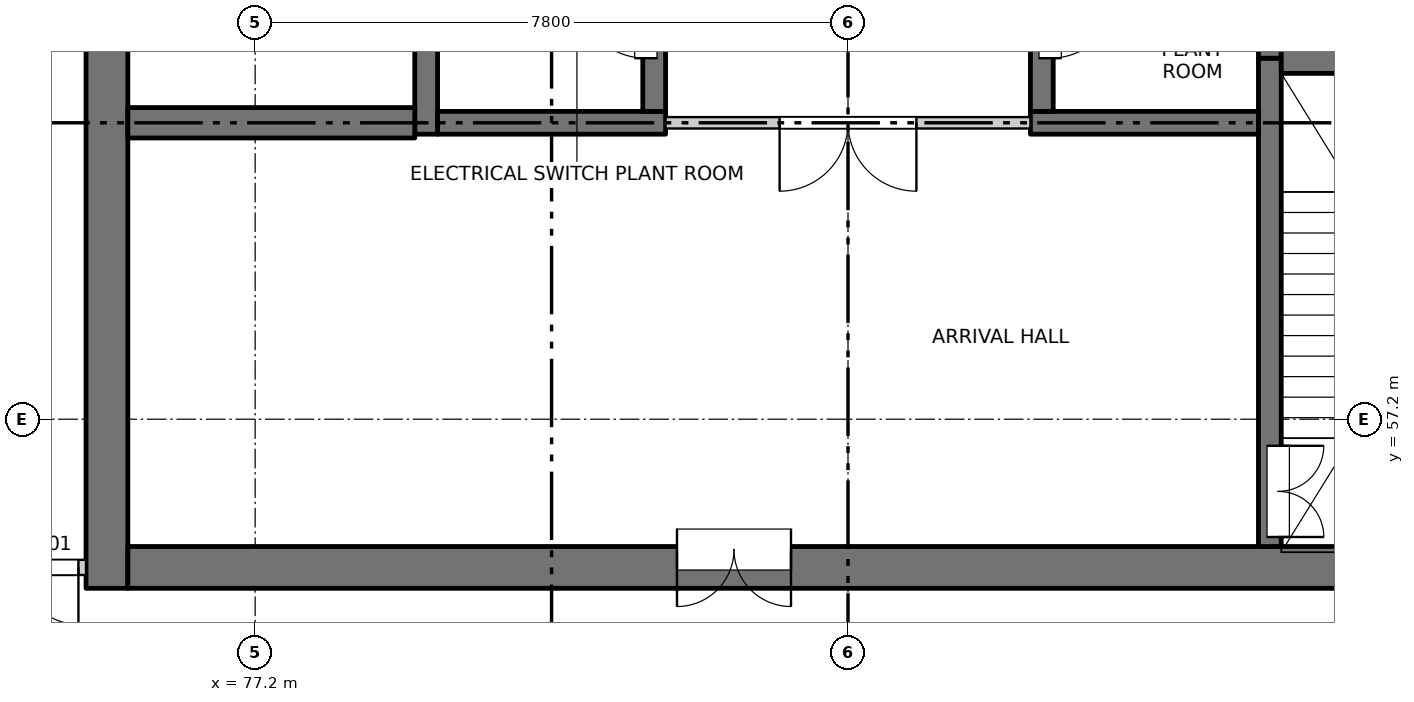
"""IFC4 building model, lengths in metres.
Left out: names, types, materials, properties, quantities, classifications, styles, units other than length and angle.
Written with IfcOpenShell. Run it as: python <this file> out.ifc"""

import sys

from ifc_helpers import new_model, si_unit, direction, frame, frame_2d, origin, place, context, subcontext, project, spatial, rectangle, extrude, element, fill, save


model = new_model("IFC4")
c1 = context("Model", 3, precision=1e-05, world=origin(), true_north=direction((0.0, 1.0)))
c2 = subcontext(c1, "Body", "Model", "MODEL_VIEW")
j1 = project(units=[si_unit("LENGTHUNIT", "METRE"), si_unit("PLANEANGLEUNIT", "RADIAN")], contexts=[c1])
p1 = place(None, origin())
s1 = spatial("IfcSite", under=j1, at=p1, CompositionType="ELEMENT")
p2 = place(p1, origin())
s2 = spatial("IfcBuilding", under=s1, at=p2, CompositionType="ELEMENT")
p3 = place(p2, frame((0.0, 0.0, 144.1)))
s3 = spatial("IfcBuildingStorey", under=s2, at=p3, CompositionType="ELEMENT", Elevation=144.1)
p4 = place(p3, frame((75.25, 54.975, -0.3), z_axis=(0.0, 0.0, 1.0), x_axis=(0.0, 1.0, 0.0)))
e1 = element("IfcWall", 1, at=p4, inside=s3, PredefinedType="SOLIDWALL", context=c2, shape_type="SweptSolid", body=[
    extrude(rectangle(XDim=22.325, YDim=0.55, at=frame_2d((11.163, 0.0))), origin(), (0.0, 0.0, 1.0), 4.5),
])
p5 = place(p4, frame((7.475, 0.0, 0.3)))
e2 = element("IfcOpeningElement", 2, at=p5, cuts=e1, PredefinedType="OPENING", context=c2, shape_type="SweptSolid", body=[
    extrude(rectangle(XDim=0.9, YDim=2.1, at=frame_2d((0.45, 1.05))), frame((0.0, 0.285, 0.0), z_axis=(0.0, -1.0, 0.0), x_axis=(1.0, 0.0, 0.0)), (0.0, 0.0, 1.0), 0.57),
])
p6 = place(p4, frame((12.125, 0.0, 0.3)))
e3 = element("IfcOpeningElement", 3, at=p6, cuts=e1, PredefinedType="OPENING", context=c2, shape_type="SweptSolid", body=[
    extrude(rectangle(XDim=0.9, YDim=2.1, at=frame_2d((0.45, 1.05))), frame((0.0, 0.285, 0.0), z_axis=(0.0, -1.0, 0.0), x_axis=(1.0, 0.0, 0.0)), (0.0, 0.0, 1.0), 0.57),
])
p7 = place(p4, frame((16.625, 0.0, 0.3)))
e4 = element("IfcOpeningElement", 4, at=p7, cuts=e1, PredefinedType="OPENING", context=c2, shape_type="SweptSolid", body=[
    extrude(rectangle(XDim=0.9, YDim=2.1, at=frame_2d((0.45, 1.05))), frame((0.0, 0.285, 0.0), z_axis=(0.0, -1.0, 0.0), x_axis=(1.0, 0.0, 0.0)), (0.0, 0.0, 1.0), 0.57),
])
p8 = place(p4, frame((20.075, 0.0, 0.3)))
e5 = element("IfcOpeningElement", 5, at=p8, cuts=e1, PredefinedType="OPENING", context=c2, shape_type="SweptSolid", body=[
    extrude(rectangle(XDim=0.9, YDim=2.1, at=frame_2d((0.45, 1.05))), frame((0.0, 0.285, 0.0), z_axis=(0.0, -1.0, 0.0), x_axis=(1.0, 0.0, 0.0)), (0.0, 0.0, 1.0), 0.57),
])
p9 = place(p3, frame((75.525, 55.25, -0.3), z_axis=(0.0, 0.0, 1.0), x_axis=(1.0, 0.0, 0.0)))
e6 = element("IfcWall", 6, at=p9, inside=s3, PredefinedType="SOLIDWALL", context=c2, shape_type="SweptSolid", body=[
    extrude(rectangle(XDim=18.95, YDim=0.55, at=frame_2d((9.475, 0.0))), origin(), (0.0, 0.0, 1.0), 4.5),
])
p10 = place(p9, frame((7.225, 0.0, 0.3)))
e7 = element("IfcOpeningElement", 7, at=p10, cuts=e6, PredefinedType="OPENING", context=c2, shape_type="SweptSolid", body=[
    extrude(rectangle(XDim=1.5, YDim=2.1, at=frame_2d((0.75, 1.05))), frame((0.0, 0.285, 0.0), z_axis=(0.0, -1.0, 0.0), x_axis=(1.0, 0.0, 0.0)), (0.0, 0.0, 1.0), 0.57),
])
p11 = place(p3, frame((79.45, 60.95, -0.3), z_axis=(0.0, 0.0, 1.0), x_axis=(0.0, 1.0, 0.0)))
e8 = element("IfcWall", 8, at=p11, inside=s3, PredefinedType="SOLIDWALL", context=c2, shape_type="SweptSolid", body=[
    extrude(rectangle(XDim=16.35, YDim=0.3, at=frame_2d((8.175, 0.0))), origin(), (0.0, 0.0, 1.0), 4.5),
])
p12 = place(p3, frame((90.55, 55.525, -0.3), z_axis=(0.0, 0.0, 1.0), x_axis=(0.0, 1.0, 0.0)))
e9 = element("IfcWall", 9, at=p12, inside=s3, PredefinedType="SOLIDWALL", context=c2, shape_type="SweptSolid", body=[
    extrude(rectangle(XDim=6.425, YDim=0.3, at=frame_2d((3.212, 0.0))), origin(), (0.0, 0.0, 1.0), 4.5),
])
p13 = place(p12, frame((0.125, 0.0, 0.3)))
e10 = element("IfcOpeningElement", 10, at=p13, cuts=e9, PredefinedType="OPENING", context=c2, shape_type="SweptSolid", body=[
    extrude(rectangle(XDim=1.2, YDim=2.1, at=frame_2d((0.6, 1.05))), frame((0.0, 0.16, 0.0), z_axis=(0.0, -1.0, 0.0), x_axis=(1.0, 0.0, 0.0)), (0.0, 0.0, 1.0), 0.32),
])
p14 = place(p3, frame((90.55, 61.95, -0.3), z_axis=(0.0, 0.0, 1.0), x_axis=(0.0, 1.0, 0.0)))
e11 = element("IfcWall", 11, at=p14, inside=s3, PredefinedType="SOLIDWALL", context=c2, shape_type="SweptSolid", body=[
    extrude(rectangle(XDim=15.35, YDim=0.3, at=frame_2d((7.675, 0.0))), origin(), (0.0, 0.0, 1.0), 4.5),
])
p15 = place(p3, frame((79.6, 61.1, -0.3), z_axis=(0.0, 0.0, 1.0), x_axis=(1.0, 0.0, 0.0)))
e12 = element("IfcWall", 12, at=p15, inside=s3, PredefinedType="SOLIDWALL", context=c2, shape_type="SweptSolid", body=[
    extrude(rectangle(XDim=3.0, YDim=0.3, at=frame_2d((1.5, 0.0))), origin(), (0.0, 0.0, 1.0), 4.5),
])
p16 = place(p3, frame((82.45, 61.25, -0.3), z_axis=(0.0, 0.0, 1.0), x_axis=(0.0, 1.0, 0.0)))
e13 = element("IfcWall", 13, at=p16, inside=s3, PredefinedType="SOLIDWALL", context=c2, shape_type="SweptSolid", body=[
    extrude(rectangle(XDim=2.3, YDim=0.3, at=frame_2d((1.15, 0.0))), origin(), (0.0, 0.0, 1.0), 4.5),
])
p17 = place(p16, frame((0.7, 0.0, 0.3)))
e14 = element("IfcOpeningElement", 14, at=p17, cuts=e13, PredefinedType="OPENING", context=c2, shape_type="SweptSolid", body=[
    extrude(rectangle(XDim=0.9, YDim=2.1, at=frame_2d((0.45, 1.05))), frame((0.0, 0.16, 0.0), z_axis=(0.0, -1.0, 0.0), x_axis=(1.0, 0.0, 0.0)), (0.0, 0.0, 1.0), 0.32),
])
p18 = place(p3, frame((87.4, 61.1, -0.3), z_axis=(0.0, 0.0, 1.0), x_axis=(1.0, 0.0, 0.0)))
e15 = element("IfcWall", 15, at=p18, inside=s3, PredefinedType="SOLIDWALL", context=c2, shape_type="SweptSolid", body=[
    extrude(rectangle(XDim=3.0, YDim=0.3, at=frame_2d((1.5, 0.0))), origin(), (0.0, 0.0, 1.0), 4.5),
])
p19 = place(p3, frame((87.55, 61.25, -0.3), z_axis=(0.0, 0.0, 1.0), x_axis=(0.0, 1.0, 0.0)))
e16 = element("IfcWall", 16, at=p19, inside=s3, PredefinedType="SOLIDWALL", context=c2, shape_type="SweptSolid", body=[
    extrude(rectangle(XDim=2.3, YDim=0.3, at=frame_2d((1.15, 0.0))), origin(), (0.0, 0.0, 1.0), 4.5),
])
p20 = place(p19, frame((0.7, 0.0, 0.3)))
e17 = element("IfcOpeningElement", 17, at=p20, cuts=e16, PredefinedType="OPENING", context=c2, shape_type="SweptSolid", body=[
    extrude(rectangle(XDim=0.9, YDim=2.1, at=frame_2d((0.45, 1.05))), frame((0.0, 0.16, 0.0), z_axis=(0.0, -1.0, 0.0), x_axis=(1.0, 0.0, 0.0)), (0.0, 0.0, 1.0), 0.32),
])
for number, where, z_axis, x_axis in (
    (18, (75.525, 61.1, -0.3), (0.0, 0.0, 1.0), (1.0, 0.0, 0.0)),
    (19, (90.7, 61.95, -0.3), (0.0, 0.0, 1.0), (1.0, 0.0, 0.0)),
):
    element("IfcWall", number, at=place(p3, frame(where, z_axis=z_axis, x_axis=x_axis)), inside=s3, PredefinedType="SOLIDWALL", context=c2, shape_type="SweptSolid", body=[
        extrude(rectangle(XDim=3.775, YDim=0.4, at=frame_2d((1.888, 0.0))), origin(), (0.0, 0.0, 1.0), 4.5),
    ])
p21 = place(p3, frame((73.2, 55.25, 0.0), z_axis=(0.0, 0.0, 1.0), x_axis=(1.0, 0.0, 0.0)))
e20 = element("IfcWall", 20, at=p21, inside=s3, PredefinedType="PARTITIONING", context=c2, shape_type="SweptSolid", body=[
    extrude(rectangle(XDim=1.775, YDim=0.2, at=frame_2d((0.887, 0.0))), origin(), (0.0, 0.0, 1.0), 4.2),
])
p22 = place(p21, frame((0.175, 0.0, 0.0)))
e21 = element("IfcOpeningElement", 21, at=p22, cuts=e20, PredefinedType="OPENING", context=c2, shape_type="SweptSolid", body=[
    extrude(rectangle(XDim=1.5, YDim=2.1, at=frame_2d((0.75, 1.05))), frame((0.0, 0.11, 0.0), z_axis=(0.0, -1.0, 0.0), x_axis=(1.0, 0.0, 0.0)), (0.0, 0.0, 1.0), 0.22),
])
p23 = place(p3, frame((82.6, 61.1, 0.0), z_axis=(0.0, 0.0, 1.0), x_axis=(1.0, 0.0, 0.0)))
e22 = element("IfcWall", 22, at=p23, inside=s3, PredefinedType="PARTITIONING", context=c2, shape_type="SweptSolid", body=[
    extrude(rectangle(XDim=4.8, YDim=0.15, at=frame_2d((2.4, 0.0))), origin(), (0.0, 0.0, 1.0), 4.2),
])
p24 = place(p23, frame((1.5, 0.0, 0.0)))
e23 = element("IfcOpeningElement", 23, at=p24, cuts=e22, PredefinedType="OPENING", context=c2, shape_type="SweptSolid", body=[
    extrude(rectangle(XDim=1.8, YDim=2.1, at=frame_2d((0.9, 1.05))), frame((0.0, 0.085, 0.0), z_axis=(0.0, -1.0, 0.0), x_axis=(1.0, 0.0, 0.0)), (0.0, 0.0, 1.0), 0.17),
])
p25 = place(p22, origin())
e24 = element("IfcDoor", 24, at=p25, inside=s3, OperationType="DOUBLE_DOOR_SINGLE_SWING", PredefinedType="DOOR", context=c2, shape_type="SweptSolid", body=[
    extrude(rectangle(XDim=1.5, YDim=2.1, at=frame_2d((0.75, 1.05))), frame((0.0, 0.025, 0.0), z_axis=(0.0, -1.0, 0.0), x_axis=(1.0, 0.0, 0.0)), (0.0, 0.0, 1.0), 0.05),
])
fill(e21, e24)
p26 = place(p10, origin())
e25 = element("IfcDoor", 25, at=p26, inside=s3, OperationType="DOUBLE_DOOR_SINGLE_SWING", PredefinedType="DOOR", context=c2, shape_type="SweptSolid", body=[
    extrude(rectangle(XDim=1.5, YDim=2.1, at=frame_2d((0.75, 1.05))), frame((0.0, 0.26, 0.0), z_axis=(0.0, -1.0, 0.0), x_axis=(1.0, 0.0, 0.0)), (0.0, 0.0, 1.0), 0.05),
])
fill(e7, e25)
p27 = place(p13, origin())
e26 = element("IfcDoor", 26, at=p27, inside=s3, OperationType="DOUBLE_DOOR_SINGLE_SWING", PredefinedType="DOOR", context=c2, shape_type="SweptSolid", body=[
    extrude(rectangle(XDim=1.2, YDim=2.1, at=frame_2d((0.6, 1.05))), frame((0.0, -0.085, 0.0), z_axis=(0.0, -1.0, 0.0), x_axis=(1.0, 0.0, 0.0)), (0.0, 0.0, 1.0), 0.05),
])
fill(e10, e26)
p28 = place(p24, origin())
e27 = element("IfcDoor", 27, at=p28, inside=s3, OperationType="DOUBLE_DOOR_SINGLE_SWING", PredefinedType="DOOR", context=c2, shape_type="SweptSolid", body=[
    extrude(rectangle(XDim=1.8, YDim=2.1, at=frame_2d((0.9, 1.05))), frame((0.0, 0.025, 0.0), z_axis=(0.0, -1.0, 0.0), x_axis=(1.0, 0.0, 0.0)), (0.0, 0.0, 1.0), 0.05),
])
fill(e23, e27)
p29 = place(p17, origin())
e28 = element("IfcDoor", 28, at=p29, inside=s3, OperationType="SINGLE_SWING_RIGHT", PredefinedType="DOOR", context=c2, shape_type="SweptSolid", body=[
    extrude(rectangle(XDim=0.9, YDim=2.1, at=frame_2d((0.45, 1.05))), frame((0.0, 0.135, 0.0), z_axis=(0.0, -1.0, 0.0), x_axis=(1.0, 0.0, 0.0)), (0.0, 0.0, 1.0), 0.05),
])
fill(e14, e28)
p30 = place(p20, origin())
e29 = element("IfcDoor", 29, at=p30, inside=s3, OperationType="SINGLE_SWING_LEFT", PredefinedType="DOOR", context=c2, shape_type="SweptSolid", body=[
    extrude(rectangle(XDim=0.9, YDim=2.1, at=frame_2d((0.45, 1.05))), frame((0.0, -0.085, 0.0), z_axis=(0.0, -1.0, 0.0), x_axis=(1.0, 0.0, 0.0)), (0.0, 0.0, 1.0), 0.05),
])
fill(e17, e29)
save(model, sys.argv[1])
